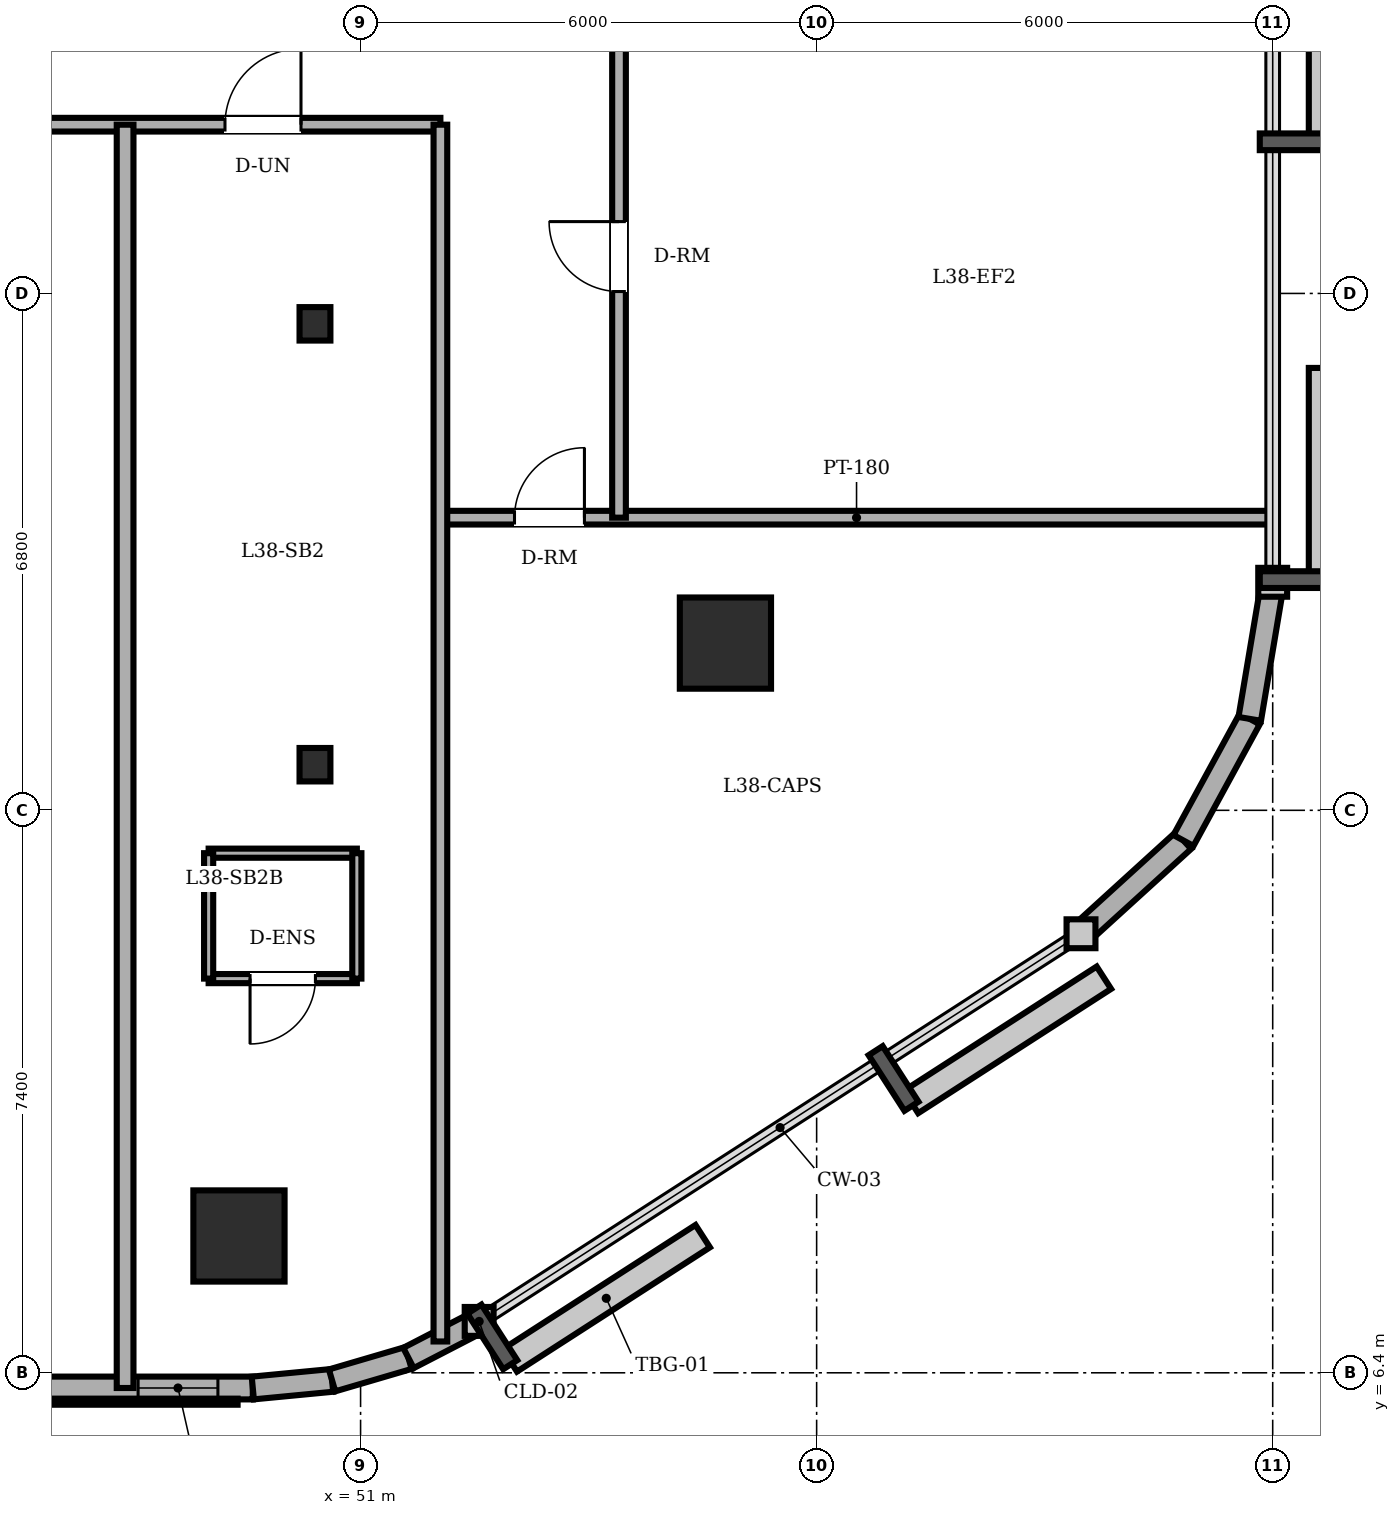
"""IFC4 building model, lengths in metres.
Left out: names, types, materials, properties, quantities, classifications, styles, units other than length and angle.
Written with IfcOpenShell. Run it as: python <this file> out.ifc"""

import sys

from ifc_helpers import new_model, si_unit, direction, frame, frame_2d, origin, origin_2d, place, context, subcontext, project, spatial, rectangle, circle, i_section, extrude, element, fill, save


model = new_model("IFC4")
c1 = context("Model", 3, precision=1e-05, world=origin(), true_north=direction((0.0, 1.0)))
c2 = subcontext(c1, "Body", "Model", "MODEL_VIEW")
j1 = project(units=[si_unit("LENGTHUNIT", "METRE"), si_unit("PLANEANGLEUNIT", "RADIAN")], contexts=[c1])
p1 = place(None, origin())
s1 = spatial("IfcSite", under=j1, at=p1, CompositionType="ELEMENT")
p2 = place(p1, origin())
s2 = spatial("IfcBuilding", under=s1, at=p2, CompositionType="ELEMENT")
p3 = place(p2, frame((0.0, 0.0, 147.4)))
s3 = spatial("IfcBuildingStorey", under=s2, at=p3, CompositionType="ELEMENT", Elevation=147.4)
for number, where, z_axis, x_axis in (
    (1, (49.4, 8.2, 0.0), (0.0, 0.0, 1.0), (1.0, 0.0, 0.0)),
    (2, (55.8, 16.0, 0.0), (0.0, 0.0, 1.0), (1.0, 0.0, 0.0)),
):
    element("IfcColumn", number, at=place(p3, frame(where, z_axis=z_axis, x_axis=x_axis)), inside=s3, PredefinedType="COLUMN", context=c2, shape_type="SweptSolid", body=[
        extrude(circle(Radius=0.6, at=origin_2d()), origin(), (0.0, 0.0, 1.0), 3.6),
    ])
for number, where, z_axis, x_axis in (
    (3, (50.4, 14.4, 0.0), (0.0, 0.0, 1.0), (1.0, 0.0, 0.0)),
    (4, (50.4, 20.2, 0.0), (0.0, 0.0, 1.0), (1.0, 0.0, 0.0)),
):
    element("IfcColumn", number, at=place(p3, frame(where, z_axis=z_axis, x_axis=x_axis)), inside=s3, PredefinedType="COLUMN", context=c2, shape_type="SweptSolid", body=[
        extrude(i_section(OverallWidth=0.406, OverallDepth=0.44, WebThickness=0.024, FlangeThickness=0.039, FilletRadius=0.015, at=origin_2d()), origin(), (0.0, 0.0, 1.0), 3.6),
    ])
p4 = place(p3, frame((19.3, 6.2, 0.0), z_axis=(0.0, 0.0, 1.0), x_axis=(1.0, 0.0, 0.0)))
e5 = element("IfcWall", 5, at=p4, inside=s3, PredefinedType="SOLIDWALL", context=c2, shape_type="SweptSolid", body=[
    extrude(rectangle(XDim=30.282, YDim=0.3, at=frame_2d((15.141, 0.0))), origin(), (0.0, 0.0, 1.0), 3.4),
])
p5 = place(p4, frame((6.525, 0.0, 0.0)))
e6 = element("IfcOpeningElement", 6, at=p5, cuts=e5, PredefinedType="OPENING", context=c2, shape_type="SweptSolid", body=[
    extrude(rectangle(XDim=0.95, YDim=2.2, at=frame_2d((0.475, 1.1))), frame((0.0, 0.16, 0.0), z_axis=(0.0, -1.0, 0.0), x_axis=(1.0, 0.0, 0.0)), (0.0, 0.0, 1.0), 0.32),
])
p6 = place(p4, frame((1.25, 0.0, 0.85)))
e7 = element("IfcOpeningElement", 7, at=p6, cuts=e5, PredefinedType="OPENING", context=c2, shape_type="SweptSolid", body=[
    extrude(rectangle(XDim=1.5, YDim=1.55, at=frame_2d((0.75, 0.775))), frame((0.0, 0.16, 0.0), z_axis=(0.0, -1.0, 0.0), x_axis=(1.0, 0.0, 0.0)), (0.0, 0.0, 1.0), 0.32),
])
p7 = place(p4, frame((2.9, 0.0, 0.85)))
e8 = element("IfcOpeningElement", 8, at=p7, cuts=e5, PredefinedType="OPENING", context=c2, shape_type="SweptSolid", body=[
    extrude(rectangle(XDim=1.5, YDim=1.55, at=frame_2d((0.75, 0.775))), frame((0.0, 0.16, 0.0), z_axis=(0.0, -1.0, 0.0), x_axis=(1.0, 0.0, 0.0)), (0.0, 0.0, 1.0), 0.32),
])
p8 = place(p4, frame((12.167, 0.0, 0.85)))
e9 = element("IfcOpeningElement", 9, at=p8, cuts=e5, PredefinedType="OPENING", context=c2, shape_type="SweptSolid", body=[
    extrude(rectangle(XDim=1.5, YDim=1.55, at=frame_2d((0.75, 0.775))), frame((0.0, 0.16, 0.0), z_axis=(0.0, -1.0, 0.0), x_axis=(1.0, 0.0, 0.0)), (0.0, 0.0, 1.0), 0.32),
])
p9 = place(p4, frame((15.983, 0.0, 0.85)))
e10 = element("IfcOpeningElement", 10, at=p9, cuts=e5, PredefinedType="OPENING", context=c2, shape_type="SweptSolid", body=[
    extrude(rectangle(XDim=1.5, YDim=1.55, at=frame_2d((0.75, 0.775))), frame((0.0, 0.16, 0.0), z_axis=(0.0, -1.0, 0.0), x_axis=(1.0, 0.0, 0.0)), (0.0, 0.0, 1.0), 0.32),
])
p10 = place(p4, frame((22.484, 0.0, 0.85)))
e11 = element("IfcOpeningElement", 11, at=p10, cuts=e5, PredefinedType="OPENING", context=c2, shape_type="SweptSolid", body=[
    extrude(rectangle(XDim=1.5, YDim=1.55, at=frame_2d((0.75, 0.775))), frame((0.0, 0.16, 0.0), z_axis=(0.0, -1.0, 0.0), x_axis=(1.0, 0.0, 0.0)), (0.0, 0.0, 1.0), 0.32),
])
p11 = place(p4, frame((25.168, 0.0, 0.85)))
e12 = element("IfcOpeningElement", 12, at=p11, cuts=e5, PredefinedType="OPENING", context=c2, shape_type="SweptSolid", body=[
    extrude(rectangle(XDim=1.5, YDim=1.55, at=frame_2d((0.75, 0.775))), frame((0.0, 0.16, 0.0), z_axis=(0.0, -1.0, 0.0), x_axis=(1.0, 0.0, 0.0)), (0.0, 0.0, 1.0), 0.32),
])
p12 = place(p4, frame((28.773, 0.0, 0.85)))
e13 = element("IfcOpeningElement", 13, at=p12, cuts=e5, PredefinedType="OPENING", context=c2, shape_type="SweptSolid", body=[
    extrude(rectangle(XDim=1.05, YDim=1.55, at=frame_2d((0.525, 0.775))), frame((0.0, 0.16, 0.0), z_axis=(0.0, -1.0, 0.0), x_axis=(1.0, 0.0, 0.0)), (0.0, 0.0, 1.0), 0.32),
])
p13 = place(p3, frame((49.582, 6.2, 0.0), z_axis=(0.0, 0.0, 1.0), x_axis=(0.995426089968, 0.095534807324, 0.0)))
e14 = element("IfcWall", 14, at=p13, inside=s3, PredefinedType="SOLIDWALL", context=c2, shape_type="SweptSolid", body=[
    extrude(rectangle(XDim=1.048, YDim=0.3, at=frame_2d((0.524, 0.0))), origin(), (0.0, 0.0, 1.0), 3.4),
])
p14 = place(p3, frame((50.625, 6.3, 0.0), z_axis=(0.0, 0.0, 1.0), x_axis=(0.959528674476, 0.281610942363, 0.0)))
e15 = element("IfcWall", 15, at=p14, inside=s3, PredefinedType="SOLIDWALL", context=c2, shape_type="SweptSolid", body=[
    extrude(rectangle(XDim=1.047, YDim=0.3, at=frame_2d((0.524, 0.0))), origin(), (0.0, 0.0, 1.0), 3.4),
])
p15 = place(p3, frame((51.63, 6.595, 0.0), z_axis=(0.0, 0.0, 1.0), x_axis=(0.888283247196, 0.459296062198, 0.0)))
e16 = element("IfcWall", 16, at=p15, inside=s3, PredefinedType="SOLIDWALL", context=c2, shape_type="SweptSolid", body=[
    extrude(rectangle(XDim=1.047, YDim=0.3, at=frame_2d((0.523, 0.0))), origin(), (0.0, 0.0, 1.0), 3.4),
])
p16 = place(p3, frame((60.478, 12.176, 0.0), z_axis=(0.0, 0.0, 1.0), x_axis=(0.73947929393, 0.673179302897, 0.0)))
e17 = element("IfcWall", 17, at=p16, inside=s3, PredefinedType="SOLIDWALL", context=c2, shape_type="SweptSolid", body=[
    extrude(rectangle(XDim=1.823, YDim=0.3, at=frame_2d((0.911, 0.0))), origin(), (0.0, 0.0, 1.0), 3.4),
])
p17 = place(p3, frame((61.826, 13.403, 0.0), z_axis=(0.0, 0.0, 1.0), x_axis=(0.478608030646, 0.878028674362, 0.0)))
e18 = element("IfcWall", 18, at=p17, inside=s3, PredefinedType="SOLIDWALL", context=c2, shape_type="SweptSolid", body=[
    extrude(rectangle(XDim=1.822, YDim=0.3, at=frame_2d((0.911, 0.0))), origin(), (0.0, 0.0, 1.0), 3.4),
])
p18 = place(p3, frame((62.698, 15.003, 0.0), z_axis=(0.0, 0.0, 1.0), x_axis=(0.165724081207, 0.986172159873, 0.0)))
e19 = element("IfcWall", 19, at=p18, inside=s3, PredefinedType="SOLIDWALL", context=c2, shape_type="SweptSolid", body=[
    extrude(rectangle(XDim=1.822, YDim=0.3, at=frame_2d((0.911, 0.0))), origin(), (0.0, 0.0, 1.0), 3.4),
])
p19 = place(p3, frame((49.001, 13.236, 0.0), z_axis=(0.0, 0.0, 1.0), x_axis=(1.0, 0.0, 0.0)))
e20 = element("IfcWall", 20, at=p19, inside=s3, PredefinedType="PARTITIONING", context=c2, shape_type="SweptSolid", body=[
    extrude(rectangle(XDim=1.95, YDim=0.12, at=frame_2d((0.975, 0.0))), origin(), (0.0, 0.0, 1.0), 3.4),
])
p20 = place(p3, frame((50.951, 11.586, 0.0), z_axis=(0.0, 0.0, 1.0), x_axis=(-1.0, 0.0, 0.0)))
e21 = element("IfcWall", 21, at=p20, inside=s3, PredefinedType="PARTITIONING", context=c2, shape_type="SweptSolid", body=[
    extrude(rectangle(XDim=1.95, YDim=0.12, at=frame_2d((0.975, 0.0))), origin(), (0.0, 0.0, 1.0), 3.4),
])
p21 = place(p20, frame((0.545, 0.0, 0.0)))
e22 = element("IfcOpeningElement", 22, at=p21, cuts=e21, PredefinedType="OPENING", context=c2, shape_type="SweptSolid", body=[
    extrude(rectangle(XDim=0.86, YDim=2.1, at=frame_2d((0.43, 1.05))), frame((0.0, 0.07, 0.0), z_axis=(0.0, -1.0, 0.0), x_axis=(1.0, 0.0, 0.0)), (0.0, 0.0, 1.0), 0.14),
])
for number, where, z_axis, x_axis in (
    (23, (49.001, 13.236, 0.0), (0.0, 0.0, 1.0), (0.0, -1.0, 0.0)),
    (24, (50.951, 11.586, 0.0), (0.0, 0.0, 1.0), (0.0, 1.0, 0.0)),
):
    element("IfcWall", number, at=place(p3, frame(where, z_axis=z_axis, x_axis=x_axis)), inside=s3, PredefinedType="PARTITIONING", context=c2, shape_type="SweptSolid", body=[
        extrude(rectangle(XDim=1.65, YDim=0.12, at=frame_2d((0.825, 0.0))), origin(), (0.0, 0.0, 1.0), 3.4),
    ])
p22 = place(p3, frame((52.05, 17.65, 0.0), z_axis=(0.0, 0.0, 1.0), x_axis=(1.0, 0.0, 0.0)))
e25 = element("IfcWall", 25, at=p22, inside=s3, PredefinedType="PARTITIONING", context=c2, shape_type="SweptSolid", body=[
    extrude(rectangle(XDim=10.95, YDim=0.18, at=frame_2d((5.475, 0.0))), origin(), (0.0, 0.0, 1.0), 3.4),
])
p23 = place(p22, frame((0.975, 0.0, 0.0)))
e26 = element("IfcOpeningElement", 26, at=p23, cuts=e25, PredefinedType="OPENING", context=c2, shape_type="SweptSolid", body=[
    extrude(rectangle(XDim=0.92, YDim=2.1, at=frame_2d((0.46, 1.05))), frame((0.0, 0.1, 0.0), z_axis=(0.0, -1.0, 0.0), x_axis=(1.0, 0.0, 0.0)), (0.0, 0.0, 1.0), 0.2),
])
p24 = place(p3, frame((39.85, 22.82, 0.0), z_axis=(0.0, 0.0, 1.0), x_axis=(1.0, 0.0, 0.0)))
e27 = element("IfcWall", 27, at=p24, inside=s3, PredefinedType="PARTITIONING", context=c2, shape_type="SweptSolid", body=[
    extrude(rectangle(XDim=12.2, YDim=0.18, at=frame_2d((6.1, 0.0))), origin(), (0.0, 0.0, 1.0), 3.4),
])
p25 = place(p24, frame((9.366, 0.0, 0.0)))
e28 = element("IfcOpeningElement", 28, at=p25, cuts=e27, PredefinedType="OPENING", context=c2, shape_type="SweptSolid", body=[
    extrude(rectangle(XDim=1.0, YDim=2.15, at=frame_2d((0.5, 1.075))), frame((0.0, 0.1, 0.0), z_axis=(0.0, -1.0, 0.0), x_axis=(1.0, 0.0, 0.0)), (0.0, 0.0, 1.0), 0.2),
])
p26 = place(p3, frame((47.902, 6.2, 0.0), z_axis=(0.0, 0.0, 1.0), x_axis=(0.0, 1.0, 0.0)))
e29 = element("IfcWall", 29, at=p26, inside=s3, PredefinedType="PARTITIONING", context=c2, shape_type="SweptSolid", body=[
    extrude(rectangle(XDim=16.62, YDim=0.22, at=frame_2d((8.31, 0.0))), origin(), (0.0, 0.0, 1.0), 3.4),
])
p27 = place(p3, frame((52.05, 6.812, 0.0), z_axis=(0.0, 0.0, 1.0), x_axis=(0.0, 1.0, 0.0)))
e30 = element("IfcWall", 30, at=p27, inside=s3, PredefinedType="PARTITIONING", context=c2, shape_type="SweptSolid", body=[
    extrude(rectangle(XDim=16.008, YDim=0.18, at=frame_2d((8.004, 0.0))), origin(), (0.0, 0.0, 1.0), 3.4),
])
p28 = place(p3, frame((54.4, 17.65, 0.0), z_axis=(0.0, 0.0, 1.0), x_axis=(0.0, 1.0, 0.0)))
e31 = element("IfcWall", 31, at=p28, inside=s3, PredefinedType="PARTITIONING", context=c2, shape_type="SweptSolid", body=[
    extrude(rectangle(XDim=12.7, YDim=0.18, at=frame_2d((6.35, 0.0))), origin(), (0.0, 0.0, 1.0), 3.4),
])
p29 = place(p28, frame((8.765, 0.0, 0.0)))
e32 = element("IfcOpeningElement", 32, at=p29, cuts=e31, PredefinedType="OPENING", context=c2, shape_type="SweptSolid", body=[
    extrude(rectangle(XDim=1.0, YDim=2.15, at=frame_2d((0.5, 1.075))), frame((0.0, 0.1, 0.0), z_axis=(0.0, -1.0, 0.0), x_axis=(1.0, 0.0, 0.0)), (0.0, 0.0, 1.0), 0.2),
])
p30 = place(p28, frame((2.975, 0.0, 0.0)))
e33 = element("IfcOpeningElement", 33, at=p30, cuts=e31, PredefinedType="OPENING", context=c2, shape_type="SweptSolid", body=[
    extrude(rectangle(XDim=0.92, YDim=2.1, at=frame_2d((0.46, 1.05))), frame((0.0, 0.1, 0.0), z_axis=(0.0, -1.0, 0.0), x_axis=(1.0, 0.0, 0.0)), (0.0, 0.0, 1.0), 0.2),
])
p31 = place(p12, origin())
e34 = element("IfcWindow", 34, at=p31, inside=s3, PartitioningType="SINGLE_PANEL", PredefinedType="WINDOW", context=c2, shape_type="SweptSolid", body=[
    extrude(rectangle(XDim=1.05, YDim=1.55, at=frame_2d((0.525, 0.775))), frame((0.0, 0.03, 0.0), z_axis=(0.0, -1.0, 0.0), x_axis=(1.0, 0.0, 0.0)), (0.0, 0.0, 1.0), 0.06),
])
fill(e13, e34)
p32 = place(p21, origin())
e35 = element("IfcDoor", 35, at=p32, inside=s3, OperationType="SINGLE_SWING_RIGHT", PredefinedType="DOOR", context=c2, shape_type="SweptSolid", body=[
    extrude(rectangle(XDim=0.86, YDim=2.1, at=frame_2d((0.43, 1.05))), frame((0.0, 0.025, 0.0), z_axis=(0.0, -1.0, 0.0), x_axis=(1.0, 0.0, 0.0)), (0.0, 0.0, 1.0), 0.05),
])
fill(e22, e35)
p33 = place(p25, origin())
e36 = element("IfcDoor", 36, at=p33, inside=s3, OperationType="SINGLE_SWING_RIGHT", PredefinedType="DOOR", context=c2, shape_type="SweptSolid", body=[
    extrude(rectangle(XDim=1.0, YDim=2.15, at=frame_2d((0.5, 1.075))), frame((0.0, 0.025, 0.0), z_axis=(0.0, -1.0, 0.0), x_axis=(1.0, 0.0, 0.0)), (0.0, 0.0, 1.0), 0.05),
])
fill(e28, e36)
p34 = place(p23, origin())
e37 = element("IfcDoor", 37, at=p34, inside=s3, OperationType="SINGLE_SWING_RIGHT", PredefinedType="DOOR", context=c2, shape_type="SweptSolid", body=[
    extrude(rectangle(XDim=0.92, YDim=2.1, at=frame_2d((0.46, 1.05))), frame((0.0, 0.025, 0.0), z_axis=(0.0, -1.0, 0.0), x_axis=(1.0, 0.0, 0.0)), (0.0, 0.0, 1.0), 0.05),
])
fill(e26, e37)
p35 = place(p30, origin())
e38 = element("IfcDoor", 38, at=p35, inside=s3, OperationType="SINGLE_SWING_RIGHT", PredefinedType="DOOR", context=c2, shape_type="SweptSolid", body=[
    extrude(rectangle(XDim=0.92, YDim=2.1, at=frame_2d((0.46, 1.05))), frame((0.0, 0.025, 0.0), z_axis=(0.0, -1.0, 0.0), x_axis=(1.0, 0.0, 0.0)), (0.0, 0.0, 1.0), 0.05),
])
fill(e33, e38)
save(model, sys.argv[1])
